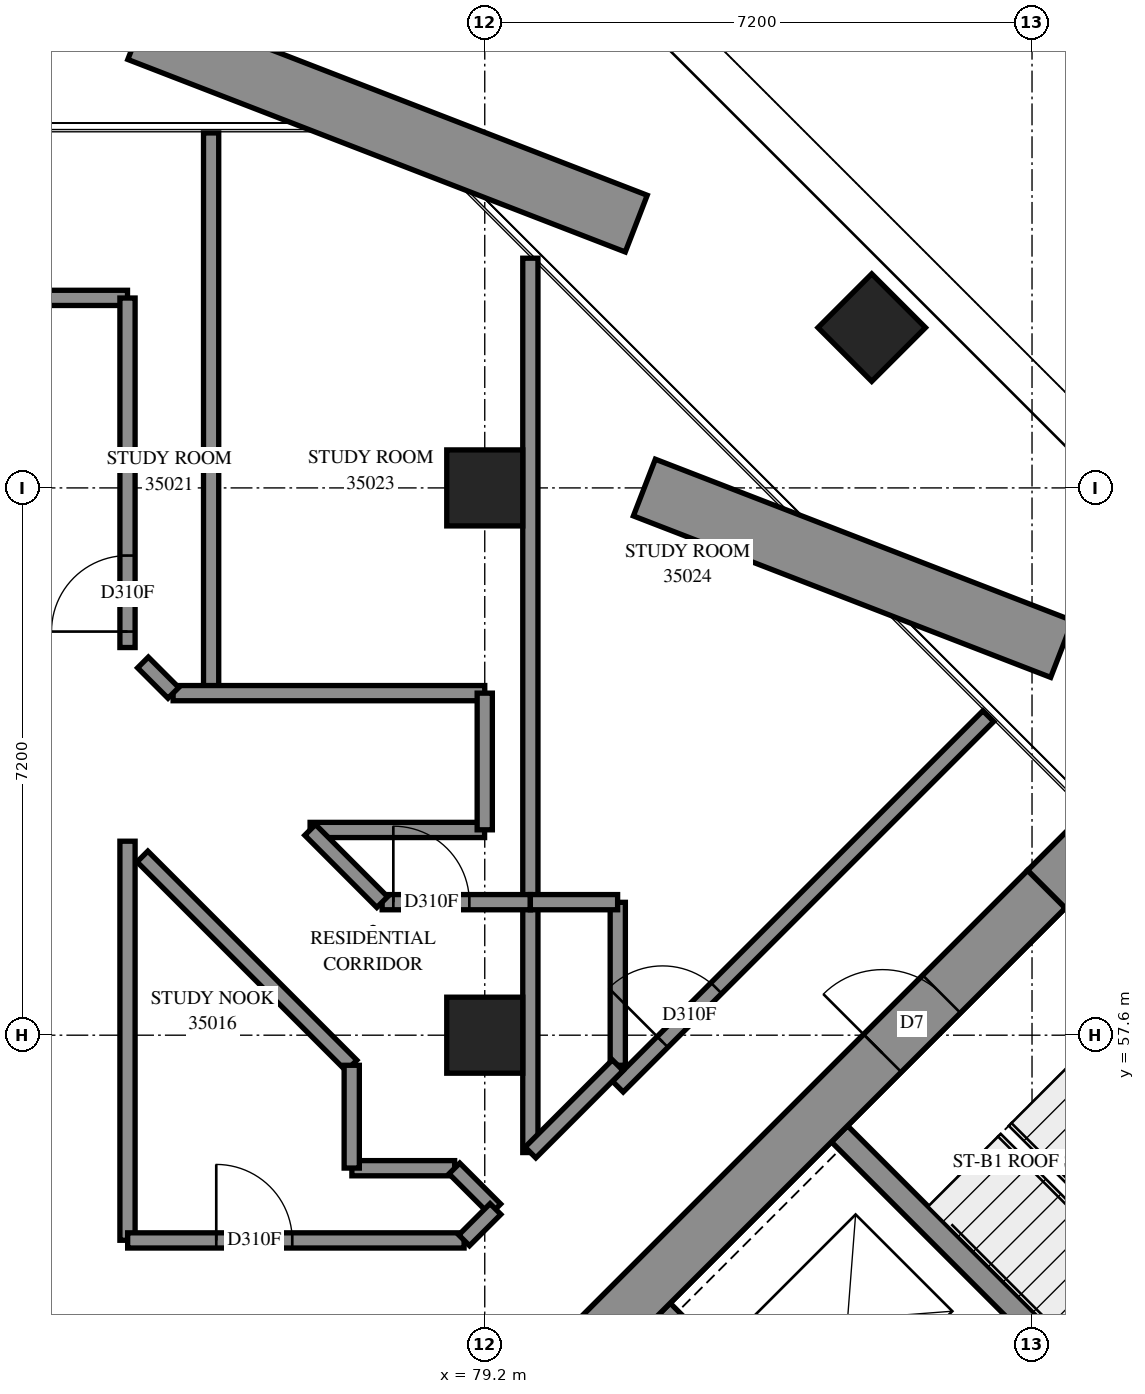
"""IFC4 building model, lengths in metres.
Left out: names, types, materials, properties, quantities, classifications, styles, units other than length and angle.
Written with IfcOpenShell. Run it as: python <this file> out.ifc"""

import sys

from ifc_helpers import new_model, si_unit, direction, frame, frame_2d, origin, origin_2d, place, context, subcontext, project, spatial, rectangle, extrude, element, fill, save


model = new_model("IFC4")
c1 = context("Model", 3, precision=1e-05, world=origin(), true_north=direction((0.0, 1.0)))
c2 = subcontext(c1, "Body", "Model", "MODEL_VIEW")
j1 = project(units=[si_unit("LENGTHUNIT", "METRE"), si_unit("PLANEANGLEUNIT", "RADIAN")], contexts=[c1])
p1 = place(None, origin())
s1 = spatial("IfcSite", under=j1, at=p1, CompositionType="ELEMENT")
p2 = place(p1, origin())
s2 = spatial("IfcBuilding", under=s1, at=p2, CompositionType="ELEMENT")
p3 = place(p2, frame((0.0, 0.0, 131.2)))
s3 = spatial("IfcBuildingStorey", under=s2, at=p3, CompositionType="ELEMENT", Elevation=131.2)
for number, where, z_axis, x_axis in (
    (1, (79.2, 57.6, 0.0), (0.0, 0.0, 1.0), (1.0, 0.0, 0.0)),
    (2, (79.2, 64.8, 0.0), (0.0, 0.0, 1.0), (1.0, 0.0, 0.0)),
    (3, (84.291, 66.909, 0.0), (0.0, 0.0, 1.0), (0.707, -0.707, 0.0)),
):
    element("IfcColumn", number, at=place(p3, frame(where, z_axis=z_axis, x_axis=x_axis)), inside=s3, PredefinedType="COLUMN", context=c2, shape_type="SweptSolid", body=[
        extrude(rectangle(XDim=1.0, YDim=1.0, at=origin_2d()), origin(), (0.0, 0.0, 1.0), 3.9),
    ])
p4 = place(p3, frame((86.589, 60.014, -0.3), z_axis=(0.0, 0.0, 1.0), x_axis=(0.7071099457, -0.7071036166, 0.0)))
e4 = element("IfcWall", 4, at=p4, inside=s3, PredefinedType="SHEAR", context=c2, shape_type="SweptSolid", body=[
    extrude(rectangle(XDim=15.8, YDim=0.7, at=frame_2d((7.9, 0.0))), origin(), (0.0, 0.0, 1.0), 3.5),
])
p5 = place(p4, frame((10.7, 0.0, 0.3)))
e5 = element("IfcOpeningElement", 5, at=p5, cuts=e4, PredefinedType="OPENING", context=c2, shape_type="SweptSolid", body=[
    extrude(rectangle(XDim=0.8, YDim=2.1, at=frame_2d((0.4, 1.05))), frame((0.0, 0.36, 0.0), z_axis=(0.0, -1.0, 0.0), x_axis=(1.0, 0.0, 0.0)), (0.0, 0.0, 1.0), 0.72),
])
p6 = place(p3, frame((76.407, 49.337, -0.3), z_axis=(0.0, 0.0, 1.0), x_axis=(0.7071067812, 0.7071067812, 0.0)))
e6 = element("IfcWall", 6, at=p6, inside=s3, PredefinedType="SHEAR", context=c2, shape_type="SweptSolid", body=[
    extrude(rectangle(XDim=14.4, YDim=0.7, at=frame_2d((7.2, 0.0))), origin(), (0.0, 0.0, 1.0), 3.5),
])
p7 = place(p6, frame((4.55, 0.0, 0.3)))
e7 = element("IfcOpeningElement", 7, at=p7, cuts=e6, PredefinedType="OPENING", context=c2, shape_type="SweptSolid", body=[
    extrude(rectangle(XDim=1.1, YDim=2.1, at=frame_2d((0.55, 1.05))), frame((0.0, 0.36, 0.0), z_axis=(0.0, -1.0, 0.0), x_axis=(1.0, 0.0, 0.0)), (0.0, 0.0, 1.0), 0.72),
])
p8 = place(p6, frame((11.35, 0.0, 0.3)))
e8 = element("IfcOpeningElement", 8, at=p8, cuts=e6, PredefinedType="OPENING", context=c2, shape_type="SweptSolid", body=[
    extrude(rectangle(XDim=1.1, YDim=2.1, at=frame_2d((0.55, 1.05))), frame((0.0, 0.36, 0.0), z_axis=(0.0, -1.0, 0.0), x_axis=(1.0, 0.0, 0.0)), (0.0, 0.0, 1.0), 0.72),
])
p9 = place(p3, frame((81.534, 53.969, 0.0), z_axis=(0.0, 0.0, 1.0), x_axis=(0.707103309, -0.7071102534, 0.0)))
e9 = element("IfcWall", 9, at=p9, inside=s3, PredefinedType="SOLIDWALL", context=c2, shape_type="SweptSolid", body=[
    extrude(rectangle(XDim=14.4, YDim=0.3, at=frame_2d((7.2, 0.0))), origin(), (0.0, 0.0, 1.0), 3.9),
])
p10 = place(p9, frame((1.25, 0.0, 0.0)))
e10 = element("IfcOpeningElement", 10, at=p10, cuts=e9, PredefinedType="OPENING", context=c2, shape_type="SweptSolid", body=[
    extrude(rectangle(XDim=1.1, YDim=2.1, at=frame_2d((0.55, 1.05))), frame((0.0, 0.16, 0.0), z_axis=(0.0, -1.0, 0.0), x_axis=(1.0, 0.0, 0.0)), (0.0, 0.0, 1.0), 0.32),
])
p11 = place(p9, frame((4.85, 0.0, 0.0)))
e11 = element("IfcOpeningElement", 11, at=p11, cuts=e9, PredefinedType="OPENING", context=c2, shape_type="SweptSolid", body=[
    extrude(rectangle(XDim=1.1, YDim=2.1, at=frame_2d((0.55, 1.05))), frame((0.0, 0.16, 0.0), z_axis=(0.0, -1.0, 0.0), x_axis=(1.0, 0.0, 0.0)), (0.0, 0.0, 1.0), 0.32),
])
p12 = place(p9, frame((8.45, 0.0, 0.0)))
e12 = element("IfcOpeningElement", 12, at=p12, cuts=e9, PredefinedType="OPENING", context=c2, shape_type="SweptSolid", body=[
    extrude(rectangle(XDim=1.1, YDim=2.1, at=frame_2d((0.55, 1.05))), frame((0.0, 0.16, 0.0), z_axis=(0.0, -1.0, 0.0), x_axis=(1.0, 0.0, 0.0)), (0.0, 0.0, 1.0), 0.32),
])
p13 = place(p9, frame((12.05, 0.0, 0.0)))
e13 = element("IfcOpeningElement", 13, at=p13, cuts=e9, PredefinedType="OPENING", context=c2, shape_type="SweptSolid", body=[
    extrude(rectangle(XDim=1.1, YDim=2.1, at=frame_2d((0.55, 1.05))), frame((0.0, 0.16, 0.0), z_axis=(0.0, -1.0, 0.0), x_axis=(1.0, 0.0, 0.0)), (0.0, 0.0, 1.0), 0.32),
])
p14 = place(p3, frame((83.867, 56.302, 0.0), z_axis=(0.0, 0.0, 1.0), x_axis=(0.7071137256, -0.7070998367, 0.0)))
e14 = element("IfcWall", 14, at=p14, inside=s3, PredefinedType="SOLIDWALL", context=c2, shape_type="SweptSolid", body=[
    extrude(rectangle(XDim=7.2, YDim=0.3, at=frame_2d((3.6, 0.0))), origin(), (0.0, 0.0, 1.0), 3.9),
])
p15 = place(p3, frame((81.193, 68.277, 0.0), z_axis=(0.0, 0.0, 1.0), x_axis=(-0.9326194654, 0.3608613761, 0.0)))
e15 = element("IfcWall", 15, at=p15, inside=s3, PredefinedType="SOLIDWALL", context=c2, shape_type="SweptSolid", body=[
    extrude(rectangle(XDim=7.018, YDim=0.8, at=frame_2d((3.509, 0.0))), origin(), (0.0, 0.0, 1.0), 0.65),
])
p16 = place(p3, frame((86.79, 62.68, 0.0), z_axis=(0.0, 0.0, 1.0), x_axis=(-0.9326208509, 0.3608577955, 0.0)))
e16 = element("IfcWall", 16, at=p16, inside=s3, PredefinedType="SOLIDWALL", context=c2, shape_type="SweptSolid", body=[
    extrude(rectangle(XDim=5.886, YDim=0.8, at=frame_2d((2.943, 0.0))), origin(), (0.0, 0.0, 1.0), 0.65),
])
p17 = place(p3, frame((55.102, 67.3, 0.0), z_axis=(0.0, 0.0, 1.0), x_axis=(1.0, 0.0, 0.0)))
e17 = element("IfcWall", 17, at=p17, inside=s3, PredefinedType="PARTITIONING", context=c2, shape_type="SweptSolid", body=[
    extrude(rectangle(XDim=19.398, YDim=0.2, at=frame_2d((9.699, 0.0))), origin(), (0.0, 0.0, 1.0), 3.9),
])
p18 = place(p17, frame((8.435, 0.0, 0.0)))
e18 = element("IfcOpeningElement", 18, at=p18, cuts=e17, PredefinedType="OPENING", context=c2, shape_type="SweptSolid", body=[
    extrude(rectangle(XDim=1.0, YDim=2.1, at=frame_2d((0.5, 1.05))), frame((0.0, 0.11, 0.0), z_axis=(0.0, -1.0, 0.0), x_axis=(1.0, 0.0, 0.0)), (0.0, 0.0, 1.0), 0.22),
])
p19 = place(p3, frame((79.8, 59.35, 0.0), z_axis=(0.0, 0.0, 1.0), x_axis=(0.0, 1.0, 0.0)))
e19 = element("IfcWall", 19, at=p19, inside=s3, PredefinedType="PARTITIONING", context=c2, shape_type="SweptSolid", body=[
    extrude(rectangle(XDim=8.472, YDim=0.2, at=frame_2d((4.236, 0.0))), origin(), (0.0, 0.0, 1.0), 3.9),
])
p20 = place(p3, frame((75.6, 62.1, 0.0), z_axis=(0.0, 0.0, 1.0), x_axis=(0.0, 1.0, 0.0)))
e20 = element("IfcWall", 20, at=p20, inside=s3, PredefinedType="PARTITIONING", context=c2, shape_type="SweptSolid", body=[
    extrude(rectangle(XDim=7.37, YDim=0.2, at=frame_2d((3.685, 0.0))), origin(), (0.0, 0.0, 1.0), 3.9),
])
p21 = place(p3, frame((80.951, 56.923, 0.0), z_axis=(0.0, 0.0, 1.0), x_axis=(0.7071067812, 0.7071067812, 0.0)))
e21 = element("IfcWall", 21, at=p21, inside=s3, PredefinedType="PARTITIONING", context=c2, shape_type="SweptSolid", body=[
    extrude(rectangle(XDim=6.893, YDim=0.2, at=frame_2d((3.446, 0.0))), origin(), (0.0, 0.0, 1.0), 3.9),
])
p22 = place(p21, frame((0.832, 0.0, 0.0)))
e22 = element("IfcOpeningElement", 22, at=p22, cuts=e21, PredefinedType="OPENING", context=c2, shape_type="SweptSolid", body=[
    extrude(rectangle(XDim=1.0, YDim=2.1, at=frame_2d((0.5, 1.05))), frame((0.0, 0.11, 0.0), z_axis=(0.0, -1.0, 0.0), x_axis=(1.0, 0.0, 0.0)), (0.0, 0.0, 1.0), 0.22),
])
p23 = place(p3, frame((74.5, 54.902, 0.0), z_axis=(0.0, 0.0, 1.0), x_axis=(0.0, 1.0, 0.0)))
e23 = element("IfcWall", 23, at=p23, inside=s3, PredefinedType="PARTITIONING", context=c2, shape_type="SweptSolid", body=[
    extrude(rectangle(XDim=5.25, YDim=0.2, at=frame_2d((2.625, 0.0))), origin(), (0.0, 0.0, 1.0), 3.9),
])
p24 = place(p3, frame((74.5, 62.7, 0.0), z_axis=(0.0, 0.0, 1.0), x_axis=(0.0, 1.0, 0.0)))
e24 = element("IfcWall", 24, at=p24, inside=s3, PredefinedType="PARTITIONING", context=c2, shape_type="SweptSolid", body=[
    extrude(rectangle(XDim=4.598, YDim=0.2, at=frame_2d((2.299, 0.0))), origin(), (0.0, 0.0, 1.0), 3.9),
])
p25 = place(p24, frame((0.21, 0.0, 0.0)))
e25 = element("IfcOpeningElement", 25, at=p25, cuts=e24, PredefinedType="OPENING", context=c2, shape_type="SweptSolid", body=[
    extrude(rectangle(XDim=1.0, YDim=2.1, at=frame_2d((0.5, 1.05))), frame((0.0, 0.11, 0.0), z_axis=(0.0, -1.0, 0.0), x_axis=(1.0, 0.0, 0.0)), (0.0, 0.0, 1.0), 0.22),
])
p26 = place(p3, frame((74.502, 54.9, 0.0), z_axis=(0.0, 0.0, 1.0), x_axis=(1.0, 0.0, 0.0)))
e26 = element("IfcWall", 26, at=p26, inside=s3, PredefinedType="PARTITIONING", context=c2, shape_type="SweptSolid", body=[
    extrude(rectangle(XDim=4.426, YDim=0.2, at=frame_2d((2.213, 0.0))), origin(), (0.0, 0.0, 1.0), 3.9),
])
p27 = place(p26, frame((1.166, 0.0, 0.0)))
e27 = element("IfcOpeningElement", 27, at=p27, cuts=e26, PredefinedType="OPENING", context=c2, shape_type="SweptSolid", body=[
    extrude(rectangle(XDim=1.0, YDim=2.1, at=frame_2d((0.5, 1.05))), frame((0.0, 0.11, 0.0), z_axis=(0.0, -1.0, 0.0), x_axis=(1.0, 0.0, 0.0)), (0.0, 0.0, 1.0), 0.22),
])
p28 = place(p3, frame((75.1, 62.1, 0.0), z_axis=(0.0, 0.0, 1.0), x_axis=(1.0, 0.0, 0.0)))
e28 = element("IfcWall", 28, at=p28, inside=s3, PredefinedType="PARTITIONING", context=c2, shape_type="SweptSolid", body=[
    extrude(rectangle(XDim=4.1, YDim=0.2, at=frame_2d((2.05, 0.0))), origin(), (0.0, 0.0, 1.0), 3.9),
])
p29 = place(p3, frame((74.697, 59.951, 0.0), z_axis=(0.0, 0.0, 1.0), x_axis=(0.7071067812, -0.7071067812, 0.0)))
e29 = element("IfcWall", 29, at=p29, inside=s3, PredefinedType="PARTITIONING", context=c2, shape_type="SweptSolid", body=[
    extrude(rectangle(XDim=3.889, YDim=0.2, at=frame_2d((1.945, 0.0))), origin(), (0.0, 0.0, 1.0), 3.9),
])
p30 = place(p3, frame((79.8, 56.056, 0.0), z_axis=(0.0, 0.0, 1.0), x_axis=(0.0, 1.0, 0.0)))
e30 = element("IfcWall", 30, at=p30, inside=s3, PredefinedType="PARTITIONING", context=c2, shape_type="SweptSolid", body=[
    extrude(rectangle(XDim=3.294, YDim=0.2, at=frame_2d((1.647, 0.0))), origin(), (0.0, 0.0, 1.0), 3.9),
])
p31 = place(p3, frame((76.902, 60.3, 0.0), z_axis=(0.0, 0.0, 1.0), x_axis=(1.0, 0.0, 0.0)))
e31 = element("IfcWall", 31, at=p31, inside=s3, PredefinedType="PARTITIONING", context=c2, shape_type="SweptSolid", body=[
    extrude(rectangle(XDim=2.296, YDim=0.2, at=frame_2d((1.148, 0.0))), origin(), (0.0, 0.0, 1.0), 3.9),
])
p32 = place(p3, frame((80.95, 57.204, 0.0), z_axis=(0.0, 0.0, 1.0), x_axis=(0.0, 1.0, 0.0)))
e32 = element("IfcWall", 32, at=p32, inside=s3, PredefinedType="PARTITIONING", context=c2, shape_type="SweptSolid", body=[
    extrude(rectangle(XDim=2.144, YDim=0.2, at=frame_2d((1.072, 0.0))), origin(), (0.0, 0.0, 1.0), 3.9),
])
p33 = place(p3, frame((77.85, 59.35, 0.0), z_axis=(0.0, 0.0, 1.0), x_axis=(1.0, 0.0, 0.0)))
e33 = element("IfcWall", 33, at=p33, inside=s3, PredefinedType="PARTITIONING", context=c2, shape_type="SweptSolid", body=[
    extrude(rectangle(XDim=1.95, YDim=0.2, at=frame_2d((0.975, 0.0))), origin(), (0.0, 0.0, 1.0), 3.9),
])
p34 = place(p33, frame((0.147, 0.0, 0.0)))
e34 = element("IfcOpeningElement", 34, at=p34, cuts=e33, PredefinedType="OPENING", context=c2, shape_type="SweptSolid", body=[
    extrude(rectangle(XDim=1.0, YDim=2.1, at=frame_2d((0.5, 1.05))), frame((0.0, 0.11, 0.0), z_axis=(0.0, -1.0, 0.0), x_axis=(1.0, 0.0, 0.0)), (0.0, 0.0, 1.0), 0.22),
])
p35 = place(p3, frame((79.2, 60.302, 0.0), z_axis=(0.0, 0.0, 1.0), x_axis=(0.0, 1.0, 0.0)))
e35 = element("IfcWall", 35, at=p35, inside=s3, PredefinedType="PARTITIONING", context=c2, shape_type="SweptSolid", body=[
    extrude(rectangle(XDim=1.798, YDim=0.2, at=frame_2d((0.899, 0.0))), origin(), (0.0, 0.0, 1.0), 3.9),
])
p36 = place(p3, frame((79.801, 56.057, 0.0), z_axis=(0.0, 0.0, 1.0), x_axis=(0.7071067812, 0.7071067812, 0.0)))
e36 = element("IfcWall", 36, at=p36, inside=s3, PredefinedType="PARTITIONING", context=c2, shape_type="SweptSolid", body=[
    extrude(rectangle(XDim=1.623, YDim=0.2, at=frame_2d((0.812, 0.0))), origin(), (0.0, 0.0, 1.0), 3.9),
])
for number, where, z_axis, x_axis in (
    (37, (77.452, 55.85, 0.0), (0.0, 0.0, 1.0), (1.0, 0.0, 0.0)),
    (38, (77.45, 55.852, 0.0), (0.0, 0.0, 1.0), (0.0, 1.0, 0.0)),
):
    element("IfcWall", number, at=place(p3, frame(where, z_axis=z_axis, x_axis=x_axis)), inside=s3, PredefinedType="PARTITIONING", context=c2, shape_type="SweptSolid", body=[
        extrude(rectangle(XDim=1.352, YDim=0.2, at=frame_2d((0.676, 0.0))), origin(), (0.0, 0.0, 1.0), 3.9),
    ])
p37 = place(p3, frame((76.903, 60.301, 0.0), z_axis=(0.0, 0.0, 1.0), x_axis=(0.7063612818, -0.7078514954, 0.0)))
e39 = element("IfcWall", 39, at=p37, inside=s3, PredefinedType="PARTITIONING", context=c2, shape_type="SweptSolid", body=[
    extrude(rectangle(XDim=1.342, YDim=0.2, at=frame_2d((0.671, 0.0))), origin(), (0.0, 0.0, 1.0), 3.9),
])
p38 = place(p3, frame((79.8, 59.35, 0.0), z_axis=(0.0, 0.0, 1.0), x_axis=(1.0, 0.0, 0.0)))
e40 = element("IfcWall", 40, at=p38, inside=s3, PredefinedType="PARTITIONING", context=c2, shape_type="SweptSolid", body=[
    extrude(rectangle(XDim=1.148, YDim=0.2, at=frame_2d((0.574, 0.0))), origin(), (0.0, 0.0, 1.0), 3.9),
])
p39 = place(p3, frame((78.801, 55.847, 0.0), z_axis=(0.0, 0.0, 1.0), x_axis=(0.7071067812, -0.7071067812, 0.0)))
e41 = element("IfcWall", 41, at=p39, inside=s3, PredefinedType="PARTITIONING", context=c2, shape_type="SweptSolid", body=[
    extrude(rectangle(XDim=0.761, YDim=0.2, at=frame_2d((0.38, 0.0))), origin(), (0.0, 0.0, 1.0), 3.9),
])
p40 = place(p3, frame((78.929, 54.901, 0.0), z_axis=(0.0, 0.0, 1.0), x_axis=(0.7071067812, 0.7071067812, 0.0)))
e42 = element("IfcWall", 42, at=p40, inside=s3, PredefinedType="PARTITIONING", context=c2, shape_type="SweptSolid", body=[
    extrude(rectangle(XDim=0.583, YDim=0.2, at=frame_2d((0.291, 0.0))), origin(), (0.0, 0.0, 1.0), 3.9),
])
p41 = place(p3, frame((74.704, 62.504, 0.0), z_axis=(0.0, 0.0, 1.0), x_axis=(0.7071067812, -0.7071067812, 0.0)))
e43 = element("IfcWall", 43, at=p41, inside=s3, PredefinedType="PARTITIONING", context=c2, shape_type="SweptSolid", body=[
    extrude(rectangle(XDim=0.566, YDim=0.2, at=frame_2d((0.283, 0.0))), origin(), (0.0, 0.0, 1.0), 3.9),
])
p42 = place(p8, origin())
e44 = element("IfcDoor", 44, at=p42, inside=s3, OperationType="SINGLE_SWING_LEFT", PredefinedType="DOOR", context=c2, shape_type="SweptSolid", body=[
    extrude(rectangle(XDim=1.1, YDim=2.1, at=frame_2d((0.55, 1.05))), frame((0.0, 0.025, 0.0), z_axis=(0.0, -1.0, 0.0), x_axis=(1.0, 0.0, 0.0)), (0.0, 0.0, 1.0), 0.05),
])
fill(e8, e44)
p43 = place(p27, origin())
e45 = element("IfcDoor", 45, at=p43, inside=s3, OperationType="SINGLE_SWING_LEFT", PredefinedType="DOOR", context=c2, shape_type="SweptSolid", body=[
    extrude(rectangle(XDim=1.0, YDim=2.1, at=frame_2d((0.5, 1.05))), frame((0.0, 0.025, 0.0), z_axis=(0.0, -1.0, 0.0), x_axis=(1.0, 0.0, 0.0)), (0.0, 0.0, 1.0), 0.05),
])
fill(e27, e45)
p44 = place(p25, origin())
e46 = element("IfcDoor", 46, at=p44, inside=s3, OperationType="SINGLE_SWING_LEFT", PredefinedType="DOOR", context=c2, shape_type="SweptSolid", body=[
    extrude(rectangle(XDim=1.0, YDim=2.1, at=frame_2d((0.5, 1.05))), frame((0.0, 0.025, 0.0), z_axis=(0.0, -1.0, 0.0), x_axis=(1.0, 0.0, 0.0)), (0.0, 0.0, 1.0), 0.05),
])
fill(e25, e46)
p45 = place(p34, origin())
e47 = element("IfcDoor", 47, at=p45, inside=s3, OperationType="SINGLE_SWING_LEFT", PredefinedType="DOOR", context=c2, shape_type="SweptSolid", body=[
    extrude(rectangle(XDim=1.0, YDim=2.1, at=frame_2d((0.5, 1.05))), frame((0.0, 0.025, 0.0), z_axis=(0.0, -1.0, 0.0), x_axis=(1.0, 0.0, 0.0)), (0.0, 0.0, 1.0), 0.05),
])
fill(e34, e47)
p46 = place(p22, origin())
e48 = element("IfcDoor", 48, at=p46, inside=s3, OperationType="SINGLE_SWING_RIGHT", PredefinedType="DOOR", context=c2, shape_type="SweptSolid", body=[
    extrude(rectangle(XDim=1.0, YDim=2.1, at=frame_2d((0.5, 1.05))), frame((0.0, 0.025, 0.0), z_axis=(0.0, -1.0, 0.0), x_axis=(1.0, 0.0, 0.0)), (0.0, 0.0, 1.0), 0.05),
])
fill(e22, e48)
save(model, sys.argv[1])
